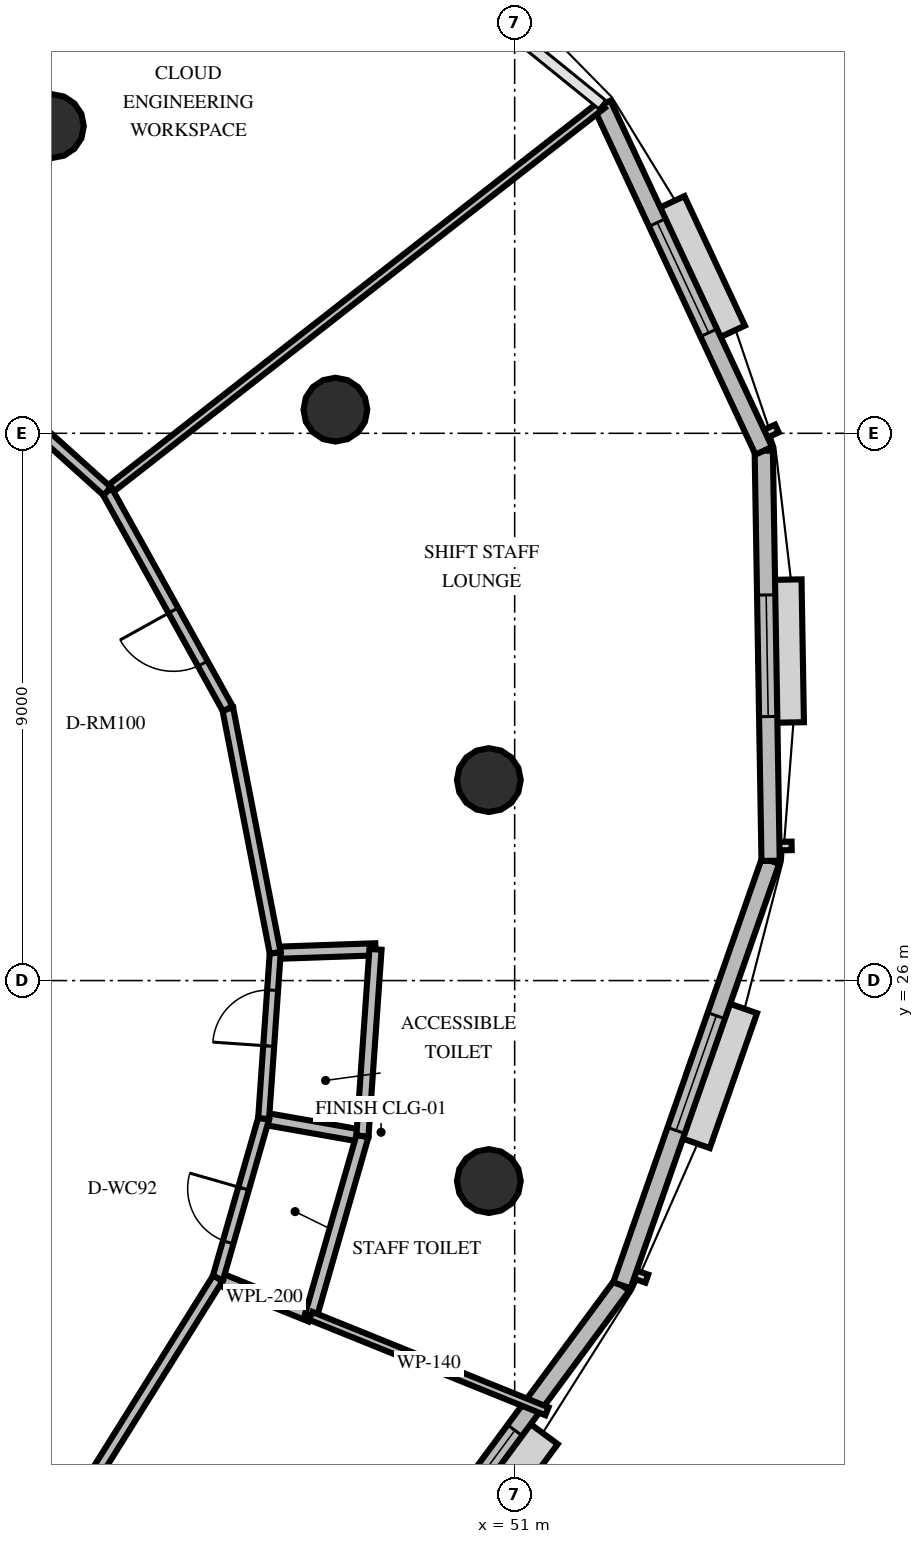
"""IFC4 building model, lengths in metres.
Left out: names, types, materials, properties, quantities, classifications, styles, units other than length and angle.
Written with IfcOpenShell. Run it as: python <this file> out.ifc"""

import sys

from ifc_helpers import new_model, si_unit, direction, frame, frame_2d, origin, origin_2d, place, context, subcontext, project, spatial, rectangle, circle, extrude, element, fill, save


model = new_model("IFC4")
c1 = context("Model", 3, precision=1e-05, world=origin(), true_north=direction((0.0, 1.0)))
c2 = subcontext(c1, "Body", "Model", "MODEL_VIEW")
j1 = project(units=[si_unit("LENGTHUNIT", "METRE"), si_unit("PLANEANGLEUNIT", "RADIAN")], contexts=[c1])
p1 = place(None, origin())
s1 = spatial("IfcSite", under=j1, at=p1, CompositionType="ELEMENT")
p2 = place(p1, origin())
s2 = spatial("IfcBuilding", under=s1, at=p2, CompositionType="ELEMENT")
p3 = place(p2, frame((0.0, 0.0, 191.6)))
s3 = spatial("IfcBuildingStorey", under=s2, at=p3, CompositionType="ELEMENT", Elevation=191.6)
for number, where, z_axis, x_axis in (
    (1, (50.575, 29.297, 0.0), (0.0, 0.0, 1.0), (1.0, 0.0, 0.0)),
    (2, (48.052, 35.389, 0.0), (0.0, 0.0, 1.0), (1.0, 0.0, 0.0)),
    (3, (43.389, 40.052, 0.0), (0.0, 0.0, 1.0), (1.0, 0.0, 0.0)),
    (4, (50.575, 22.703, 0.0), (0.0, 0.0, 1.0), (1.0, 0.0, 0.0)),
):
    element("IfcColumn", number, at=place(p3, frame(where, z_axis=z_axis, x_axis=x_axis)), inside=s3, PredefinedType="COLUMN", context=c2, shape_type="SweptSolid", body=[
        extrude(circle(Radius=0.525, at=origin_2d()), origin(), (0.0, 0.0, 1.0), 3.6),
    ])
p4 = place(p3, frame((48.055, 14.611, 0.0), z_axis=(0.0, 0.0, 1.0), x_axis=(0.594010832638, 0.804457040934, 0.0)))
e5 = element("IfcWall", 5, at=p4, inside=s3, PredefinedType="SOLIDWALL", context=c2, shape_type="SweptSolid", body=[
    extrude(rectangle(XDim=7.927, YDim=0.3, at=frame_2d((3.963, 0.0))), origin(), (0.0, 0.0, 1.0), 2.66),
])
p5 = place(p4, frame((2.964, 0.0, 0.8)))
e6 = element("IfcOpeningElement", 6, at=p5, cuts=e5, PredefinedType="OPENING", context=c2, shape_type="SweptSolid", body=[
    extrude(rectangle(XDim=2.0, YDim=1.85, at=frame_2d((1.0, 0.925))), frame((0.0, 0.16, 0.0), z_axis=(0.0, -1.0, 0.0), x_axis=(1.0, 0.0, 0.0)), (0.0, 0.0, 1.0), 0.32),
])
p6 = place(p3, frame((52.764, 20.988, 0.0), z_axis=(0.0, 0.0, 1.0), x_axis=(0.330587092265, 0.943775489419, 0.0)))
e7 = element("IfcWall", 7, at=p6, inside=s3, PredefinedType="SOLIDWALL", context=c2, shape_type="SweptSolid", body=[
    extrude(rectangle(XDim=7.398, YDim=0.3, at=frame_2d((3.699, 0.0))), origin(), (0.0, 0.0, 1.0), 2.66),
])
p7 = place(p6, frame((2.699, 0.0, 0.8)))
e8 = element("IfcOpeningElement", 8, at=p7, cuts=e7, PredefinedType="OPENING", context=c2, shape_type="SweptSolid", body=[
    extrude(rectangle(XDim=2.0, YDim=1.85, at=frame_2d((1.0, 0.925))), frame((0.0, 0.16, 0.0), z_axis=(0.0, -1.0, 0.0), x_axis=(1.0, 0.0, 0.0)), (0.0, 0.0, 1.0), 0.32),
])
p8 = place(p3, frame((55.209, 27.969, 0.0), z_axis=(0.0, 0.0, 1.0), x_axis=(-0.016686063519, 0.999860777951, 0.0)))
e9 = element("IfcWall", 9, at=p8, inside=s3, PredefinedType="SOLIDWALL", context=c2, shape_type="SweptSolid", body=[
    extrude(rectangle(XDim=6.745, YDim=0.3, at=frame_2d((3.373, 0.0))), origin(), (0.0, 0.0, 1.0), 2.66),
])
p9 = place(p8, frame((2.373, 0.0, 0.8)))
e10 = element("IfcOpeningElement", 10, at=p9, cuts=e9, PredefinedType="OPENING", context=c2, shape_type="SweptSolid", body=[
    extrude(rectangle(XDim=2.0, YDim=1.85, at=frame_2d((1.0, 0.925))), frame((0.0, 0.16, 0.0), z_axis=(0.0, -1.0, 0.0), x_axis=(1.0, 0.0, 0.0)), (0.0, 0.0, 1.0), 0.32),
])
p10 = place(p3, frame((55.097, 34.713, 0.0), z_axis=(0.0, 0.0, 1.0), x_axis=(-0.422942902265, 0.906156333876, 0.0)))
e11 = element("IfcWall", 11, at=p10, inside=s3, PredefinedType="SOLIDWALL", context=c2, shape_type="SweptSolid", body=[
    extrude(rectangle(XDim=6.283, YDim=0.3, at=frame_2d((3.141, 0.0))), origin(), (0.0, 0.0, 1.0), 2.66),
])
p11 = place(p10, frame((2.141, 0.0, 0.8)))
e12 = element("IfcOpeningElement", 12, at=p11, cuts=e11, PredefinedType="OPENING", context=c2, shape_type="SweptSolid", body=[
    extrude(rectangle(XDim=2.0, YDim=1.85, at=frame_2d((1.0, 0.925))), frame((0.0, 0.16, 0.0), z_axis=(0.0, -1.0, 0.0), x_axis=(1.0, 0.0, 0.0)), (0.0, 0.0, 1.0), 0.32),
])
p12 = place(p3, frame((46.118, 21.104, 0.0), z_axis=(0.0, 0.0, 1.0), x_axis=(0.927164752012, -0.374653870427, 0.0)))
e13 = element("IfcWall", 13, at=p12, inside=s3, PredefinedType="PLUMBINGWALL", context=c2, shape_type="SweptSolid", body=[
    extrude(rectangle(XDim=1.65, YDim=0.2, at=frame_2d((0.825, 0.0))), origin(), (0.0, 0.0, 1.0), 2.46),
])
p13 = place(p3, frame((46.871, 23.73, 0.0), z_axis=(0.0, 0.0, 1.0), x_axis=(0.98479845015, -0.173700928557, 0.0)))
e14 = element("IfcWall", 14, at=p13, inside=s3, PredefinedType="PLUMBINGWALL", context=c2, shape_type="SweptSolid", body=[
    extrude(rectangle(XDim=1.65, YDim=0.2, at=frame_2d((0.825, 0.0))), origin(), (0.0, 0.0, 1.0), 2.46),
])
p14 = place(p3, frame((47.648, 20.486, 0.0), z_axis=(0.0, 0.0, 1.0), x_axis=(0.275622173579, 0.961266049245, 0.0)))
e15 = element("IfcWall", 15, at=p14, inside=s3, PredefinedType="PLUMBINGWALL", context=c2, shape_type="SweptSolid", body=[
    extrude(rectangle(XDim=3.077, YDim=0.2, at=frame_2d((1.539, 0.0))), origin(), (0.0, 0.0, 1.0), 2.46),
])
p15 = place(p3, frame((46.118, 21.104, 0.0), z_axis=(0.0, 0.0, 1.0), x_axis=(0.275570735837, 0.961280796412, 0.0)))
e16 = element("IfcWall", 16, at=p15, inside=s3, PredefinedType="PARTITIONING", context=c2, shape_type="SweptSolid", body=[
    extrude(rectangle(XDim=2.732, YDim=0.18, at=frame_2d((1.366, 0.0))), origin(), (0.0, 0.0, 1.0), 2.46),
])
p16 = place(p15, frame((0.616, 0.0, 0.0)))
e17 = element("IfcOpeningElement", 17, at=p16, cuts=e16, PredefinedType="OPENING", context=c2, shape_type="SweptSolid", body=[
    extrude(rectangle(XDim=0.92, YDim=2.1, at=frame_2d((0.46, 1.05))), frame((0.0, 0.1, 0.0), z_axis=(0.0, -1.0, 0.0), x_axis=(1.0, 0.0, 0.0)), (0.0, 0.0, 1.0), 0.2),
])
p17 = place(p3, frame((47.062, 26.456, 0.0), z_axis=(0.0, 0.0, 1.0), x_axis=(0.999390077819, 0.034920944383, 0.0)))
e18 = element("IfcWall", 18, at=p17, inside=s3, PredefinedType="PLUMBINGWALL", context=c2, shape_type="SweptSolid", body=[
    extrude(rectangle(XDim=1.65, YDim=0.2, at=frame_2d((0.825, 0.0))), origin(), (0.0, 0.0, 1.0), 2.46),
])
p18 = place(p3, frame((48.496, 23.444, 0.0), z_axis=(0.0, 0.0, 1.0), x_axis=(0.069735967902, 0.997565483956, 0.0)))
e19 = element("IfcWall", 19, at=p18, inside=s3, PredefinedType="PLUMBINGWALL", context=c2, shape_type="SweptSolid", body=[
    extrude(rectangle(XDim=3.077, YDim=0.2, at=frame_2d((1.539, 0.0))), origin(), (0.0, 0.0, 1.0), 2.46),
])
p19 = place(p3, frame((46.871, 23.73, 0.0), z_axis=(0.0, 0.0, 1.0), x_axis=(0.069786446257, 0.997561953925, 0.0)))
e20 = element("IfcWall", 20, at=p19, inside=s3, PredefinedType="PARTITIONING", context=c2, shape_type="SweptSolid", body=[
    extrude(rectangle(XDim=2.732, YDim=0.18, at=frame_2d((1.366, 0.0))), origin(), (0.0, 0.0, 1.0), 2.46),
])
p20 = place(p19, frame((1.197, 0.0, 0.0)))
e21 = element("IfcOpeningElement", 21, at=p20, cuts=e20, PredefinedType="OPENING", context=c2, shape_type="SweptSolid", body=[
    extrude(rectangle(XDim=0.92, YDim=2.1, at=frame_2d((0.46, 1.05))), frame((0.0, 0.1, 0.0), z_axis=(0.0, -1.0, 0.0), x_axis=(1.0, 0.0, 0.0)), (0.0, 0.0, 1.0), 0.2),
])
p21 = place(p3, frame((47.648, 20.486, 0.0), z_axis=(0.0, 0.0, 1.0), x_axis=(0.927180311417, -0.374615362901, 0.0)))
e22 = element("IfcWall", 22, at=p21, inside=s3, PredefinedType="PARTITIONING", context=c2, shape_type="SweptSolid", body=[
    extrude(rectangle(XDim=4.187, YDim=0.14, at=frame_2d((2.094, 0.0))), origin(), (0.0, 0.0, 1.0), 2.46),
])
p22 = place(p3, frame((44.299, 34.047, 0.0), z_axis=(0.0, 0.0, 1.0), x_axis=(0.788006457951, 0.615666973475, 0.0)))
e23 = element("IfcWall", 23, at=p22, inside=s3, PredefinedType="PARTITIONING", context=c2, shape_type="SweptSolid", body=[
    extrude(rectangle(XDim=10.33, YDim=0.14, at=frame_2d((5.165, 0.0))), origin(), (0.0, 0.0, 1.0), 2.46),
])
p23 = place(p3, frame((47.062, 26.456, 0.0), z_axis=(0.0, 0.0, 1.0), x_axis=(-0.190808935383, 0.981627195109, 0.0)))
e24 = element("IfcWall", 24, at=p23, inside=s3, PredefinedType="PARTITIONING", context=c2, shape_type="SweptSolid", body=[
    extrude(rectangle(XDim=4.089, YDim=0.18, at=frame_2d((2.045, 0.0))), origin(), (0.0, 0.0, 1.0), 2.46),
])
p24 = place(p3, frame((46.282, 30.47, 0.0), z_axis=(0.0, 0.0, 1.0), x_axis=(-0.48480627272, 0.874621562695, 0.0)))
e25 = element("IfcWall", 25, at=p24, inside=s3, PredefinedType="PARTITIONING", context=c2, shape_type="SweptSolid", body=[
    extrude(rectangle(XDim=4.089, YDim=0.18, at=frame_2d((2.044, 0.0))), origin(), (0.0, 0.0, 1.0), 2.46),
])
p25 = place(p24, frame((0.847, 0.0, 0.0)))
e26 = element("IfcOpeningElement", 26, at=p25, cuts=e25, PredefinedType="OPENING", context=c2, shape_type="SweptSolid", body=[
    extrude(rectangle(XDim=1.0, YDim=2.15, at=frame_2d((0.5, 1.075))), frame((0.0, 0.1, 0.0), z_axis=(0.0, -1.0, 0.0), x_axis=(1.0, 0.0, 0.0)), (0.0, 0.0, 1.0), 0.2),
])
for number, where, z_axis, x_axis in (
    (27, (44.299, 34.047, 0.0), (0.0, 0.0, 1.0), (-0.743, 0.669, 0.0)),
    (28, (43.713, 17.254, 0.0), (0.0, 0.0, 1.0), (0.53, 0.848, 0.0)),
):
    element("IfcWall", number, at=place(p3, frame(where, z_axis=z_axis, x_axis=x_axis)), inside=s3, PredefinedType="PARTITIONING", context=c2, shape_type="SweptSolid", body=[
        extrude(rectangle(XDim=4.539, YDim=0.18, at=frame_2d((2.27, 0.0))), origin(), (0.0, 0.0, 1.0), 2.46),
    ])
p26 = place(p5, origin())
e29 = element("IfcWindow", 29, at=p26, inside=s3, PartitioningType="SINGLE_PANEL", PredefinedType="WINDOW", context=c2, shape_type="SweptSolid", body=[
    extrude(rectangle(XDim=2.0, YDim=1.85, at=frame_2d((1.0, 0.925))), frame((0.0, 0.03, 0.0), z_axis=(0.0, -1.0, 0.0), x_axis=(1.0, 0.0, 0.0)), (0.0, 0.0, 1.0), 0.06),
])
fill(e6, e29)
p27 = place(p7, origin())
e30 = element("IfcWindow", 30, at=p27, inside=s3, PartitioningType="SINGLE_PANEL", PredefinedType="WINDOW", context=c2, shape_type="SweptSolid", body=[
    extrude(rectangle(XDim=2.0, YDim=1.85, at=frame_2d((1.0, 0.925))), frame((0.0, 0.03, 0.0), z_axis=(0.0, -1.0, 0.0), x_axis=(1.0, 0.0, 0.0)), (0.0, 0.0, 1.0), 0.06),
])
fill(e8, e30)
p28 = place(p9, origin())
e31 = element("IfcWindow", 31, at=p28, inside=s3, PartitioningType="SINGLE_PANEL", PredefinedType="WINDOW", context=c2, shape_type="SweptSolid", body=[
    extrude(rectangle(XDim=2.0, YDim=1.85, at=frame_2d((1.0, 0.925))), frame((0.0, 0.03, 0.0), z_axis=(0.0, -1.0, 0.0), x_axis=(1.0, 0.0, 0.0)), (0.0, 0.0, 1.0), 0.06),
])
fill(e10, e31)
p29 = place(p11, origin())
e32 = element("IfcWindow", 32, at=p29, inside=s3, PartitioningType="SINGLE_PANEL", PredefinedType="WINDOW", context=c2, shape_type="SweptSolid", body=[
    extrude(rectangle(XDim=2.0, YDim=1.85, at=frame_2d((1.0, 0.925))), frame((0.0, 0.03, 0.0), z_axis=(0.0, -1.0, 0.0), x_axis=(1.0, 0.0, 0.0)), (0.0, 0.0, 1.0), 0.06),
])
fill(e12, e32)
p30 = place(p16, origin())
e33 = element("IfcDoor", 33, at=p30, inside=s3, OperationType="SINGLE_SWING_RIGHT", PredefinedType="DOOR", context=c2, shape_type="SweptSolid", body=[
    extrude(rectangle(XDim=0.92, YDim=2.1, at=frame_2d((0.46, 1.05))), frame((0.0, 0.025, 0.0), z_axis=(0.0, -1.0, 0.0), x_axis=(1.0, 0.0, 0.0)), (0.0, 0.0, 1.0), 0.05),
])
fill(e17, e33)
p31 = place(p20, origin())
e34 = element("IfcDoor", 34, at=p31, inside=s3, OperationType="SINGLE_SWING_LEFT", PredefinedType="DOOR", context=c2, shape_type="SweptSolid", body=[
    extrude(rectangle(XDim=0.92, YDim=2.1, at=frame_2d((0.46, 1.05))), frame((0.0, 0.025, 0.0), z_axis=(0.0, -1.0, 0.0), x_axis=(1.0, 0.0, 0.0)), (0.0, 0.0, 1.0), 0.05),
])
fill(e21, e34)
p32 = place(p25, origin())
e35 = element("IfcDoor", 35, at=p32, inside=s3, OperationType="SINGLE_SWING_RIGHT", PredefinedType="DOOR", context=c2, shape_type="SweptSolid", body=[
    extrude(rectangle(XDim=1.0, YDim=2.15, at=frame_2d((0.5, 1.075))), frame((0.0, 0.025, 0.0), z_axis=(0.0, -1.0, 0.0), x_axis=(1.0, 0.0, 0.0)), (0.0, 0.0, 1.0), 0.05),
])
fill(e26, e35)
save(model, sys.argv[1])
